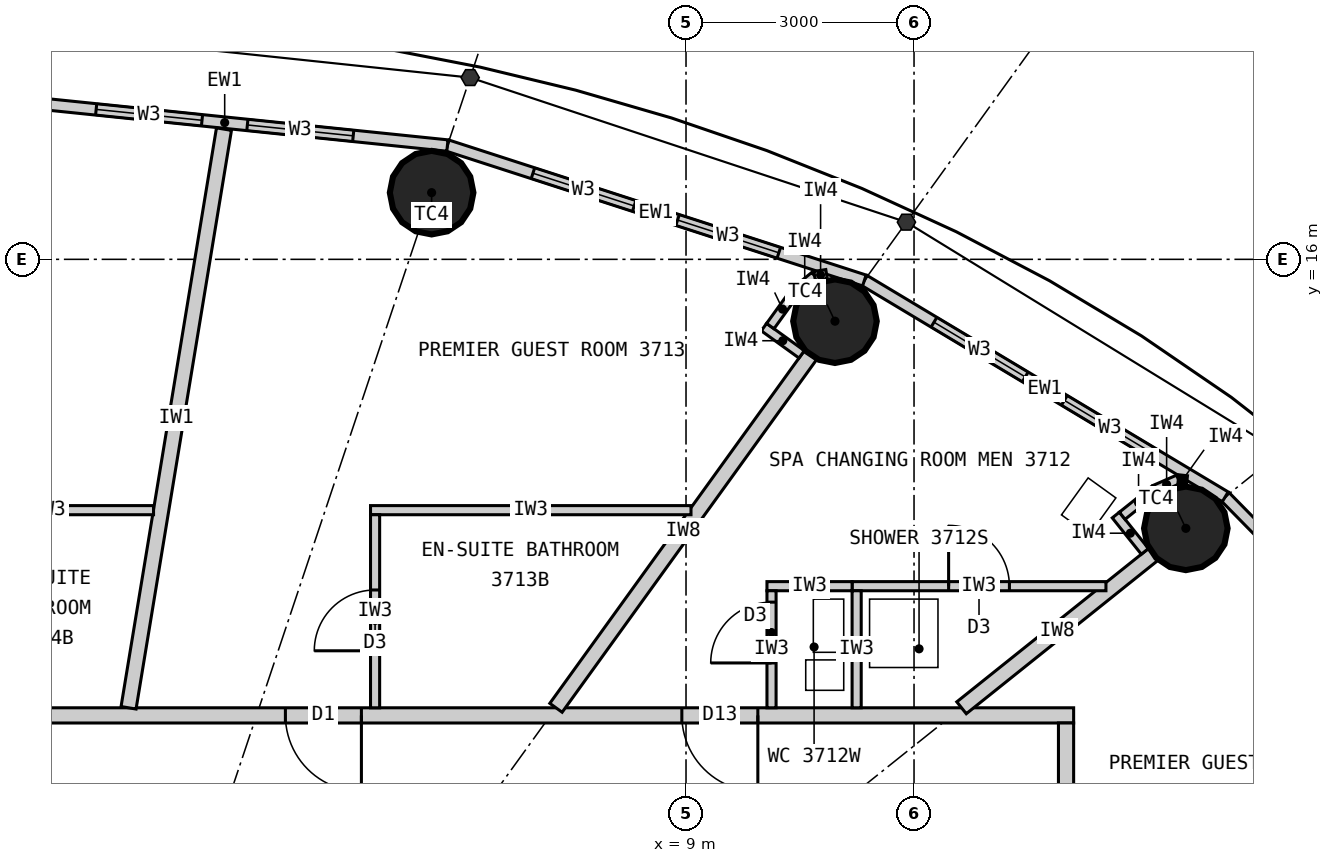
"""IFC4 building model, lengths in metres.
Left out: names, types, materials, properties, quantities, classifications, styles, units other than length and angle.
Written with IfcOpenShell. Run it as: python <this file> out.ifc"""

import sys

from ifc_helpers import new_model, si_unit, direction, frame, frame_2d, origin, origin_2d, place, context, subcontext, project, spatial, rectangle, circle, extrude, element, fill, save


model = new_model("IFC4")
c1 = context("Model", 3, precision=1e-05, world=origin(), true_north=direction((0.0, 1.0)))
c2 = subcontext(c1, "Body", "Model", "MODEL_VIEW")
j1 = project(units=[si_unit("LENGTHUNIT", "METRE"), si_unit("PLANEANGLEUNIT", "RADIAN")], contexts=[c1])
p1 = place(None, origin())
s1 = spatial("IfcSite", under=j1, at=p1, CompositionType="ELEMENT")
p2 = place(p1, origin())
s2 = spatial("IfcBuilding", under=s1, at=p2, CompositionType="ELEMENT")
p3 = place(p2, frame((0.0, 0.0, 143.4)))
s3 = spatial("IfcBuildingStorey", under=s2, at=p3, CompositionType="ELEMENT", Elevation=143.4)
for number, where, z_axis, x_axis in (
    (1, (15.576, 12.461, 0.0), (0.0, 0.0, 1.0), (1.0, 0.0, 0.0)),
    (2, (10.96, 15.186, 0.0), (0.0, 0.0, 1.0), (1.0, 0.0, 0.0)),
    (3, (5.653, 16.877, 0.0), (0.0, 0.0, 1.0), (1.0, 0.0, 0.0)),
):
    element("IfcColumn", number, at=place(p3, frame(where, z_axis=z_axis, x_axis=x_axis)), inside=s3, PredefinedType="COLUMN", context=c2, shape_type="SweptSolid", body=[
        extrude(circle(Radius=0.55, at=origin_2d()), origin(), (0.0, 0.0, 1.0), 3.3),
    ])
p4 = place(p3, frame((19.772, 9.132, 0.0), z_axis=(0.0, 0.0, 1.0), x_axis=(-0.700727467776, 0.71342905457, 0.0)))
e4 = element("IfcWall", 4, at=p4, inside=s3, PredefinedType="ELEMENTEDWALL", context=c2, shape_type="SweptSolid", body=[
    extrude(rectangle(XDim=5.247, YDim=0.15, at=frame_2d((2.624, 0.0))), origin(), (0.0, 0.0, 1.0), 3.12),
])
p5 = place(p4, frame((0.924, 0.0, 0.9)))
e5 = element("IfcOpeningElement", 5, at=p5, cuts=e4, PredefinedType="OPENING", context=c2, shape_type="SweptSolid", body=[
    extrude(rectangle(XDim=1.4, YDim=1.9, at=frame_2d((0.7, 0.95))), frame((0.0, 0.085, 0.0), z_axis=(0.0, -1.0, 0.0), x_axis=(1.0, 0.0, 0.0)), (0.0, 0.0, 1.0), 0.17),
])
p6 = place(p4, frame((2.924, 0.0, 0.9)))
e6 = element("IfcOpeningElement", 6, at=p6, cuts=e4, PredefinedType="OPENING", context=c2, shape_type="SweptSolid", body=[
    extrude(rectangle(XDim=1.4, YDim=1.9, at=frame_2d((0.7, 0.95))), frame((0.0, 0.085, 0.0), z_axis=(0.0, -1.0, 0.0), x_axis=(1.0, 0.0, 0.0)), (0.0, 0.0, 1.0), 0.17),
])
p7 = place(p3, frame((16.095, 12.876, 0.0), z_axis=(0.0, 0.0, 1.0), x_axis=(-0.857695199231, 0.514158482587, 0.0)))
e7 = element("IfcWall", 7, at=p7, inside=s3, PredefinedType="ELEMENTEDWALL", context=c2, shape_type="SweptSolid", body=[
    extrude(rectangle(XDim=5.536, YDim=0.15, at=frame_2d((2.768, 0.0))), origin(), (0.0, 0.0, 1.0), 3.12),
])
p8 = place(p7, frame((1.068, 0.0, 0.9)))
e8 = element("IfcOpeningElement", 8, at=p8, cuts=e7, PredefinedType="OPENING", context=c2, shape_type="SweptSolid", body=[
    extrude(rectangle(XDim=1.4, YDim=1.9, at=frame_2d((0.7, 0.95))), frame((0.0, 0.085, 0.0), z_axis=(0.0, -1.0, 0.0), x_axis=(1.0, 0.0, 0.0)), (0.0, 0.0, 1.0), 0.17),
])
p9 = place(p7, frame((3.068, 0.0, 0.9)))
e9 = element("IfcOpeningElement", 9, at=p9, cuts=e7, PredefinedType="OPENING", context=c2, shape_type="SweptSolid", body=[
    extrude(rectangle(XDim=1.4, YDim=1.9, at=frame_2d((0.7, 0.95))), frame((0.0, 0.085, 0.0), z_axis=(0.0, -1.0, 0.0), x_axis=(1.0, 0.0, 0.0)), (0.0, 0.0, 1.0), 0.17),
])
p10 = place(p3, frame((11.346, 15.722, 0.0), z_axis=(0.0, 0.0, 1.0), x_axis=(-0.951432482129, 0.307857486429, 0.0)))
e10 = element("IfcWall", 10, at=p10, inside=s3, PredefinedType="ELEMENTEDWALL", context=c2, shape_type="SweptSolid", body=[
    extrude(rectangle(XDim=5.766, YDim=0.15, at=frame_2d((2.883, 0.0))), origin(), (0.0, 0.0, 1.0), 3.12),
])
p11 = place(p10, frame((1.183, 0.0, 0.9)))
e11 = element("IfcOpeningElement", 11, at=p11, cuts=e10, PredefinedType="OPENING", context=c2, shape_type="SweptSolid", body=[
    extrude(rectangle(XDim=1.4, YDim=1.9, at=frame_2d((0.7, 0.95))), frame((0.0, 0.085, 0.0), z_axis=(0.0, -1.0, 0.0), x_axis=(1.0, 0.0, 0.0)), (0.0, 0.0, 1.0), 0.17),
])
p12 = place(p10, frame((3.183, 0.0, 0.9)))
e12 = element("IfcOpeningElement", 12, at=p12, cuts=e10, PredefinedType="OPENING", context=c2, shape_type="SweptSolid", body=[
    extrude(rectangle(XDim=1.4, YDim=1.9, at=frame_2d((0.7, 0.95))), frame((0.0, 0.085, 0.0), z_axis=(0.0, -1.0, 0.0), x_axis=(1.0, 0.0, 0.0)), (0.0, 0.0, 1.0), 0.17),
])
p13 = place(p3, frame((5.86, 17.497, 0.0), z_axis=(0.0, 0.0, 1.0), x_axis=(-0.994751738032, 0.102318032045, 0.0)))
e13 = element("IfcWall", 13, at=p13, inside=s3, PredefinedType="ELEMENTEDWALL", context=c2, shape_type="SweptSolid", body=[
    extrude(rectangle(XDim=5.891, YDim=0.15, at=frame_2d((2.946, 0.0))), origin(), (0.0, 0.0, 1.0), 3.12),
])
p14 = place(p13, frame((1.246, 0.0, 0.9)))
e14 = element("IfcOpeningElement", 14, at=p14, cuts=e13, PredefinedType="OPENING", context=c2, shape_type="SweptSolid", body=[
    extrude(rectangle(XDim=1.4, YDim=1.9, at=frame_2d((0.7, 0.95))), frame((0.0, 0.085, 0.0), z_axis=(0.0, -1.0, 0.0), x_axis=(1.0, 0.0, 0.0)), (0.0, 0.0, 1.0), 0.17),
])
p15 = place(p13, frame((3.246, 0.0, 0.9)))
e15 = element("IfcOpeningElement", 15, at=p15, cuts=e13, PredefinedType="OPENING", context=c2, shape_type="SweptSolid", body=[
    extrude(rectangle(XDim=1.4, YDim=1.9, at=frame_2d((0.7, 0.95))), frame((0.0, 0.085, 0.0), z_axis=(0.0, -1.0, 0.0), x_axis=(1.0, 0.0, 0.0)), (0.0, 0.0, 1.0), 0.17),
])
p16 = place(p3, frame((-14.1, 10.0, 0.0), z_axis=(0.0, 0.0, 1.0), x_axis=(1.0, 0.0, 0.0)))
e16 = element("IfcWall", 16, at=p16, inside=s3, PredefinedType="PARTITIONING", context=c2, shape_type="SweptSolid", body=[
    extrude(rectangle(XDim=28.2, YDim=0.2, at=frame_2d((14.1, 0.0))), origin(), (0.0, 0.0, 1.0), 3.12),
])
p17 = place(p16, frame((23.045, 0.0, 0.0)))
e17 = element("IfcOpeningElement", 17, at=p17, cuts=e16, PredefinedType="OPENING", context=c2, shape_type="SweptSolid", body=[
    extrude(rectangle(XDim=1.0, YDim=2.2, at=frame_2d((0.5, 1.1))), frame((0.0, 0.11, 0.0), z_axis=(0.0, -1.0, 0.0), x_axis=(1.0, 0.0, 0.0)), (0.0, 0.0, 1.0), 0.22),
])
p18 = place(p16, frame((17.829, 0.0, 0.0)))
e18 = element("IfcOpeningElement", 18, at=p18, cuts=e16, PredefinedType="OPENING", context=c2, shape_type="SweptSolid", body=[
    extrude(rectangle(XDim=1.0, YDim=2.2, at=frame_2d((0.5, 1.1))), frame((0.0, 0.11, 0.0), z_axis=(0.0, -1.0, 0.0), x_axis=(1.0, 0.0, 0.0)), (0.0, 0.0, 1.0), 0.22),
])
p19 = place(p16, frame((12.205, 0.0, 0.0)))
e19 = element("IfcOpeningElement", 19, at=p19, cuts=e16, PredefinedType="OPENING", context=c2, shape_type="SweptSolid", body=[
    extrude(rectangle(XDim=1.0, YDim=2.2, at=frame_2d((0.5, 1.1))), frame((0.0, 0.11, 0.0), z_axis=(0.0, -1.0, 0.0), x_axis=(1.0, 0.0, 0.0)), (0.0, 0.0, 1.0), 0.22),
])
p20 = place(p16, frame((7.857, 0.0, 0.0)))
e20 = element("IfcOpeningElement", 20, at=p20, cuts=e16, PredefinedType="OPENING", context=c2, shape_type="SweptSolid", body=[
    extrude(rectangle(XDim=1.0, YDim=2.2, at=frame_2d((0.5, 1.1))), frame((0.0, 0.11, 0.0), z_axis=(0.0, -1.0, 0.0), x_axis=(1.0, 0.0, 0.0)), (0.0, 0.0, 1.0), 0.22),
])
p21 = place(p16, frame((2.801, 0.0, 0.0)))
e21 = element("IfcOpeningElement", 21, at=p21, cuts=e16, PredefinedType="OPENING", context=c2, shape_type="SweptSolid", body=[
    extrude(rectangle(XDim=1.0, YDim=2.2, at=frame_2d((0.5, 1.1))), frame((0.0, 0.11, 0.0), z_axis=(0.0, -1.0, 0.0), x_axis=(1.0, 0.0, 0.0)), (0.0, 0.0, 1.0), 0.22),
])
p22 = place(p3, frame((14.0, -9.9, 0.0), z_axis=(0.0, 0.0, 1.0), x_axis=(0.0, 1.0, 0.0)))
e22 = element("IfcWall", 22, at=p22, inside=s3, PredefinedType="PARTITIONING", context=c2, shape_type="SweptSolid", body=[
    extrude(rectangle(XDim=19.8, YDim=0.2, at=frame_2d((9.9, 0.0))), origin(), (0.0, 0.0, 1.0), 3.12),
])
p23 = place(p22, frame((3.124, 0.0, 0.0)))
e23 = element("IfcOpeningElement", 23, at=p23, cuts=e22, PredefinedType="OPENING", context=c2, shape_type="SweptSolid", body=[
    extrude(rectangle(XDim=1.0, YDim=2.2, at=frame_2d((0.5, 1.1))), frame((0.0, 0.11, 0.0), z_axis=(0.0, -1.0, 0.0), x_axis=(1.0, 0.0, 0.0)), (0.0, 0.0, 1.0), 0.22),
])
p24 = place(p22, frame((6.574, 0.0, 0.0)))
e24 = element("IfcOpeningElement", 24, at=p24, cuts=e22, PredefinedType="OPENING", context=c2, shape_type="SweptSolid", body=[
    extrude(rectangle(XDim=1.6, YDim=2.4, at=frame_2d((0.8, 1.2))), frame((0.0, 0.11, 0.0), z_axis=(0.0, -1.0, 0.0), x_axis=(1.0, 0.0, 0.0)), (0.0, 0.0, 1.0), 0.22),
])
p25 = place(p22, frame((17.701, 0.0, 0.0)))
e25 = element("IfcOpeningElement", 25, at=p25, cuts=e22, PredefinedType="OPENING", context=c2, shape_type="SweptSolid", body=[
    extrude(rectangle(XDim=1.0, YDim=2.2, at=frame_2d((0.5, 1.1))), frame((0.0, 0.11, 0.0), z_axis=(0.0, -1.0, 0.0), x_axis=(1.0, 0.0, 0.0)), (0.0, 0.0, 1.0), 0.22),
])
p26 = place(p3, frame((12.625, 10.1, 0.0), z_axis=(0.0, 0.0, 1.0), x_axis=(0.780876185034, 0.624685827954, 0.0)))
e26 = element("IfcWall", 26, at=p26, inside=s3, PredefinedType="PARTITIONING", context=c2, shape_type="SweptSolid", body=[
    extrude(rectangle(XDim=3.229, YDim=0.2, at=frame_2d((1.615, 0.0))), origin(), (0.0, 0.0, 1.0), 2.27),
])
p27 = place(p3, frame((7.289, 10.1, 0.0), z_axis=(0.0, 0.0, 1.0), x_axis=(0.585222595178, 0.810872686735, 0.0)))
e27 = element("IfcWall", 27, at=p27, inside=s3, PredefinedType="PARTITIONING", context=c2, shape_type="SweptSolid", body=[
    extrude(rectangle(XDim=5.722, YDim=0.2, at=frame_2d((2.861, 0.0))), origin(), (0.0, 0.0, 1.0), 2.27),
])
p28 = place(p3, frame((1.666, 10.1, 0.0), z_axis=(0.0, 0.0, 1.0), x_axis=(0.162669562982, 0.986680603478, 0.0)))
e28 = element("IfcWall", 28, at=p28, inside=s3, PredefinedType="PARTITIONING", context=c2, shape_type="SweptSolid", body=[
    extrude(rectangle(XDim=7.716, YDim=0.2, at=frame_2d((3.858, 0.0))), origin(), (0.0, 0.0, 1.0), 3.12),
])
p29 = place(p3, frame((14.525, 11.7, 0.0), z_axis=(0.0, 0.0, 1.0), x_axis=(-1.0, 0.0, 0.0)))
e29 = element("IfcWall", 29, at=p29, inside=s3, PredefinedType="PARTITIONING", context=c2, shape_type="SweptSolid", body=[
    extrude(rectangle(XDim=3.34, YDim=0.12, at=frame_2d((1.67, 0.0))), origin(), (0.0, 0.0, 1.0), 3.12),
])
p30 = place(p29, frame((1.27, 0.0, 0.0)))
e30 = element("IfcOpeningElement", 30, at=p30, cuts=e29, PredefinedType="OPENING", context=c2, shape_type="SweptSolid", body=[
    extrude(rectangle(XDim=0.8, YDim=2.1, at=frame_2d((0.4, 1.05))), frame((0.0, 0.07, 0.0), z_axis=(0.0, -1.0, 0.0), x_axis=(1.0, 0.0, 0.0)), (0.0, 0.0, 1.0), 0.14),
])
p31 = place(p3, frame((11.245, 10.1, 0.0), z_axis=(0.0, 0.0, 1.0), x_axis=(0.0, 1.0, 0.0)))
e31 = element("IfcWall", 31, at=p31, inside=s3, PredefinedType="PARTITIONING", context=c2, shape_type="SweptSolid", body=[
    extrude(rectangle(XDim=1.54, YDim=0.12, at=frame_2d((0.77, 0.0))), origin(), (0.0, 0.0, 1.0), 3.12),
])
p32 = place(p3, frame((11.185, 11.7, 0.0), z_axis=(0.0, 0.0, 1.0), x_axis=(-1.0, 0.0, 0.0)))
e32 = element("IfcWall", 32, at=p32, inside=s3, PredefinedType="PARTITIONING", context=c2, shape_type="SweptSolid", body=[
    extrude(rectangle(XDim=1.12, YDim=0.12, at=frame_2d((0.56, 0.0))), origin(), (0.0, 0.0, 1.0), 3.12),
])
p33 = place(p3, frame((10.125, 10.1, 0.0), z_axis=(0.0, 0.0, 1.0), x_axis=(0.0, 1.0, 0.0)))
e33 = element("IfcWall", 33, at=p33, inside=s3, PredefinedType="PARTITIONING", context=c2, shape_type="SweptSolid", body=[
    extrude(rectangle(XDim=1.54, YDim=0.12, at=frame_2d((0.77, 0.0))), origin(), (0.0, 0.0, 1.0), 3.12),
])
p34 = place(p33, frame((0.59, 0.0, 0.0)))
e34 = element("IfcOpeningElement", 34, at=p34, cuts=e33, PredefinedType="OPENING", context=c2, shape_type="SweptSolid", body=[
    extrude(rectangle(XDim=0.8, YDim=2.1, at=frame_2d((0.4, 1.05))), frame((0.0, 0.07, 0.0), z_axis=(0.0, -1.0, 0.0), x_axis=(1.0, 0.0, 0.0)), (0.0, 0.0, 1.0), 0.14),
])
p35 = place(p3, frame((9.065, 12.7, 0.0), z_axis=(0.0, 0.0, 1.0), x_axis=(-1.0, 0.0, 0.0)))
e35 = element("IfcWall", 35, at=p35, inside=s3, PredefinedType="PARTITIONING", context=c2, shape_type="SweptSolid", body=[
    extrude(rectangle(XDim=4.216, YDim=0.12, at=frame_2d((2.108, 0.0))), origin(), (0.0, 0.0, 1.0), 3.12),
])
p36 = place(p3, frame((4.909, 10.1, 0.0), z_axis=(0.0, 0.0, 1.0), x_axis=(0.0, 1.0, 0.0)))
e36 = element("IfcWall", 36, at=p36, inside=s3, PredefinedType="PARTITIONING", context=c2, shape_type="SweptSolid", body=[
    extrude(rectangle(XDim=2.54, YDim=0.12, at=frame_2d((1.27, 0.0))), origin(), (0.0, 0.0, 1.0), 3.12),
])
p37 = place(p36, frame((0.75, 0.0, 0.0)))
e37 = element("IfcOpeningElement", 37, at=p37, cuts=e36, PredefinedType="OPENING", context=c2, shape_type="SweptSolid", body=[
    extrude(rectangle(XDim=0.8, YDim=2.1, at=frame_2d((0.4, 1.05))), frame((0.0, 0.07, 0.0), z_axis=(0.0, -1.0, 0.0), x_axis=(1.0, 0.0, 0.0)), (0.0, 0.0, 1.0), 0.14),
])
p38 = place(p3, frame((1.994, 12.7, 0.0), z_axis=(0.0, 0.0, 1.0), x_axis=(-1.0, 0.0, 0.0)))
e38 = element("IfcWall", 38, at=p38, inside=s3, PredefinedType="PARTITIONING", context=c2, shape_type="SweptSolid", body=[
    extrude(rectangle(XDim=2.769, YDim=0.12, at=frame_2d((1.384, 0.0))), origin(), (0.0, 0.0, 1.0), 3.12),
])
p39 = place(p3, frame((15.037, 12.158, 0.0), z_axis=(0.0, 0.0, 1.0), x_axis=(-0.624840920722, 0.78075208856, 0.0)))
e39 = element("IfcWall", 39, at=p39, inside=s3, PredefinedType="PARTITIONING", context=c2, shape_type="SweptSolid", body=[
    extrude(rectangle(XDim=0.612, YDim=0.12, at=frame_2d((0.306, 0.0))), origin(), (0.0, 0.0, 1.0), 3.12),
])
p40 = place(p3, frame((14.739, 12.627, 0.0), z_axis=(0.0, 0.0, 1.0), x_axis=(0.780912119987, 0.624640905527, 0.0)))
e40 = element("IfcWall", 40, at=p40, inside=s3, PredefinedType="PARTITIONING", context=c2, shape_type="SweptSolid", body=[
    extrude(rectangle(XDim=0.55, YDim=0.12, at=frame_2d((0.275, 0.0))), origin(), (0.0, 0.0, 1.0), 3.12),
])
p41 = place(p3, frame((15.169, 12.97, 0.0), z_axis=(0.0, 0.0, 1.0), x_axis=(0.915974725257, 0.401235968838, 0.0)))
e41 = element("IfcWall", 41, at=p41, inside=s3, PredefinedType="PARTITIONING", context=c2, shape_type="SweptSolid", body=[
    extrude(rectangle(XDim=0.338, YDim=0.12, at=frame_2d((0.169, 0.0))), origin(), (0.0, 0.0, 1.0), 3.12),
])
p42 = place(p3, frame((15.478, 13.106, 0.0), z_axis=(0.0, 0.0, 1.0), x_axis=(0.993778813557, -0.111371763588, 0.0)))
e42 = element("IfcWall", 42, at=p42, inside=s3, PredefinedType="PARTITIONING", context=c2, shape_type="SweptSolid", body=[
    extrude(rectangle(XDim=0.114, YDim=0.12, at=frame_2d((0.057, 0.0))), origin(), (0.0, 0.0, 1.0), 3.12),
])
p43 = place(p3, frame((10.522, 14.75, 0.0), z_axis=(0.0, 0.0, 1.0), x_axis=(-0.811057588427, 0.584966313777, 0.0)))
e43 = element("IfcWall", 43, at=p43, inside=s3, PredefinedType="PARTITIONING", context=c2, shape_type="SweptSolid", body=[
    extrude(rectangle(XDim=0.612, YDim=0.12, at=frame_2d((0.306, 0.0))), origin(), (0.0, 0.0, 1.0), 3.12),
])
p44 = place(p3, frame((10.109, 15.122, 0.0), z_axis=(0.0, 0.0, 1.0), x_axis=(0.585344718358, 0.810784534072, 0.0)))
e44 = element("IfcWall", 44, at=p44, inside=s3, PredefinedType="PARTITIONING", context=c2, shape_type="SweptSolid", body=[
    extrude(rectangle(XDim=0.55, YDim=0.12, at=frame_2d((0.275, 0.0))), origin(), (0.0, 0.0, 1.0), 3.12),
])
p45 = place(p3, frame((10.431, 15.568, 0.0), z_axis=(0.0, 0.0, 1.0), x_axis=(0.77505137267, 0.631898227345, 0.0)))
e45 = element("IfcWall", 45, at=p45, inside=s3, PredefinedType="PARTITIONING", context=c2, shape_type="SweptSolid", body=[
    extrude(rectangle(XDim=0.338, YDim=0.12, at=frame_2d((0.169, 0.0))), origin(), (0.0, 0.0, 1.0), 3.12),
])
p46 = place(p3, frame((10.693, 15.781, 0.0), z_axis=(0.0, 0.0, 1.0), x_axis=(0.987256785332, 0.159135287777, 0.0)))
e46 = element("IfcWall", 46, at=p46, inside=s3, PredefinedType="PARTITIONING", context=c2, shape_type="SweptSolid", body=[
    extrude(rectangle(XDim=0.158, YDim=0.12, at=frame_2d((0.079, 0.0))), origin(), (0.0, 0.0, 1.0), 3.12),
])
p47 = place(p8, origin())
e47 = element("IfcWindow", 47, at=p47, inside=s3, PartitioningType="SINGLE_PANEL", PredefinedType="WINDOW", context=c2, shape_type="SweptSolid", body=[
    extrude(rectangle(XDim=1.4, YDim=1.9, at=frame_2d((0.7, 0.95))), frame((0.0, 0.03, 0.0), z_axis=(0.0, -1.0, 0.0), x_axis=(1.0, 0.0, 0.0)), (0.0, 0.0, 1.0), 0.06),
])
fill(e8, e47)
p48 = place(p9, origin())
e48 = element("IfcWindow", 48, at=p48, inside=s3, PartitioningType="SINGLE_PANEL", PredefinedType="WINDOW", context=c2, shape_type="SweptSolid", body=[
    extrude(rectangle(XDim=1.4, YDim=1.9, at=frame_2d((0.7, 0.95))), frame((0.0, 0.03, 0.0), z_axis=(0.0, -1.0, 0.0), x_axis=(1.0, 0.0, 0.0)), (0.0, 0.0, 1.0), 0.06),
])
fill(e9, e48)
p49 = place(p11, origin())
e49 = element("IfcWindow", 49, at=p49, inside=s3, PartitioningType="SINGLE_PANEL", PredefinedType="WINDOW", context=c2, shape_type="SweptSolid", body=[
    extrude(rectangle(XDim=1.4, YDim=1.9, at=frame_2d((0.7, 0.95))), frame((0.0, 0.03, 0.0), z_axis=(0.0, -1.0, 0.0), x_axis=(1.0, 0.0, 0.0)), (0.0, 0.0, 1.0), 0.06),
])
fill(e11, e49)
p50 = place(p12, origin())
e50 = element("IfcWindow", 50, at=p50, inside=s3, PartitioningType="SINGLE_PANEL", PredefinedType="WINDOW", context=c2, shape_type="SweptSolid", body=[
    extrude(rectangle(XDim=1.4, YDim=1.9, at=frame_2d((0.7, 0.95))), frame((0.0, 0.03, 0.0), z_axis=(0.0, -1.0, 0.0), x_axis=(1.0, 0.0, 0.0)), (0.0, 0.0, 1.0), 0.06),
])
fill(e12, e50)
p51 = place(p14, origin())
e51 = element("IfcWindow", 51, at=p51, inside=s3, PartitioningType="SINGLE_PANEL", PredefinedType="WINDOW", context=c2, shape_type="SweptSolid", body=[
    extrude(rectangle(XDim=1.4, YDim=1.9, at=frame_2d((0.7, 0.95))), frame((0.0, 0.03, 0.0), z_axis=(0.0, -1.0, 0.0), x_axis=(1.0, 0.0, 0.0)), (0.0, 0.0, 1.0), 0.06),
])
fill(e14, e51)
p52 = place(p15, origin())
e52 = element("IfcWindow", 52, at=p52, inside=s3, PartitioningType="SINGLE_PANEL", PredefinedType="WINDOW", context=c2, shape_type="SweptSolid", body=[
    extrude(rectangle(XDim=1.4, YDim=1.9, at=frame_2d((0.7, 0.95))), frame((0.0, 0.03, 0.0), z_axis=(0.0, -1.0, 0.0), x_axis=(1.0, 0.0, 0.0)), (0.0, 0.0, 1.0), 0.06),
])
fill(e15, e52)
p53 = place(p30, origin())
e53 = element("IfcDoor", 53, at=p53, inside=s3, OperationType="SINGLE_SWING_RIGHT", PredefinedType="DOOR", context=c2, shape_type="SweptSolid", body=[
    extrude(rectangle(XDim=0.8, YDim=2.1, at=frame_2d((0.4, 1.05))), frame((0.0, 0.025, 0.0), z_axis=(0.0, -1.0, 0.0), x_axis=(1.0, 0.0, 0.0)), (0.0, 0.0, 1.0), 0.05),
])
fill(e30, e53)
p54 = place(p34, origin())
e54 = element("IfcDoor", 54, at=p54, inside=s3, OperationType="SINGLE_SWING_LEFT", PredefinedType="DOOR", context=c2, shape_type="SweptSolid", body=[
    extrude(rectangle(XDim=0.8, YDim=2.1, at=frame_2d((0.4, 1.05))), frame((0.0, 0.025, 0.0), z_axis=(0.0, -1.0, 0.0), x_axis=(1.0, 0.0, 0.0)), (0.0, 0.0, 1.0), 0.05),
])
fill(e34, e54)
p55 = place(p17, origin())
e55 = element("IfcDoor", 55, at=p55, inside=s3, OperationType="SINGLE_SWING_RIGHT", PredefinedType="DOOR", context=c2, shape_type="SweptSolid", body=[
    extrude(rectangle(XDim=1.0, YDim=2.2, at=frame_2d((0.5, 1.1))), frame((0.0, 0.025, 0.0), z_axis=(0.0, -1.0, 0.0), x_axis=(1.0, 0.0, 0.0)), (0.0, 0.0, 1.0), 0.05),
])
fill(e17, e55)
p56 = place(p37, origin())
e56 = element("IfcDoor", 56, at=p56, inside=s3, OperationType="SINGLE_SWING_LEFT", PredefinedType="DOOR", context=c2, shape_type="SweptSolid", body=[
    extrude(rectangle(XDim=0.8, YDim=2.1, at=frame_2d((0.4, 1.05))), frame((0.0, 0.025, 0.0), z_axis=(0.0, -1.0, 0.0), x_axis=(1.0, 0.0, 0.0)), (0.0, 0.0, 1.0), 0.05),
])
fill(e37, e56)
p57 = place(p18, origin())
e57 = element("IfcDoor", 57, at=p57, inside=s3, OperationType="SINGLE_SWING_RIGHT", PredefinedType="DOOR", context=c2, shape_type="SweptSolid", body=[
    extrude(rectangle(XDim=1.0, YDim=2.2, at=frame_2d((0.5, 1.1))), frame((0.0, 0.025, 0.0), z_axis=(0.0, -1.0, 0.0), x_axis=(1.0, 0.0, 0.0)), (0.0, 0.0, 1.0), 0.05),
])
fill(e18, e57)
save(model, sys.argv[1])
